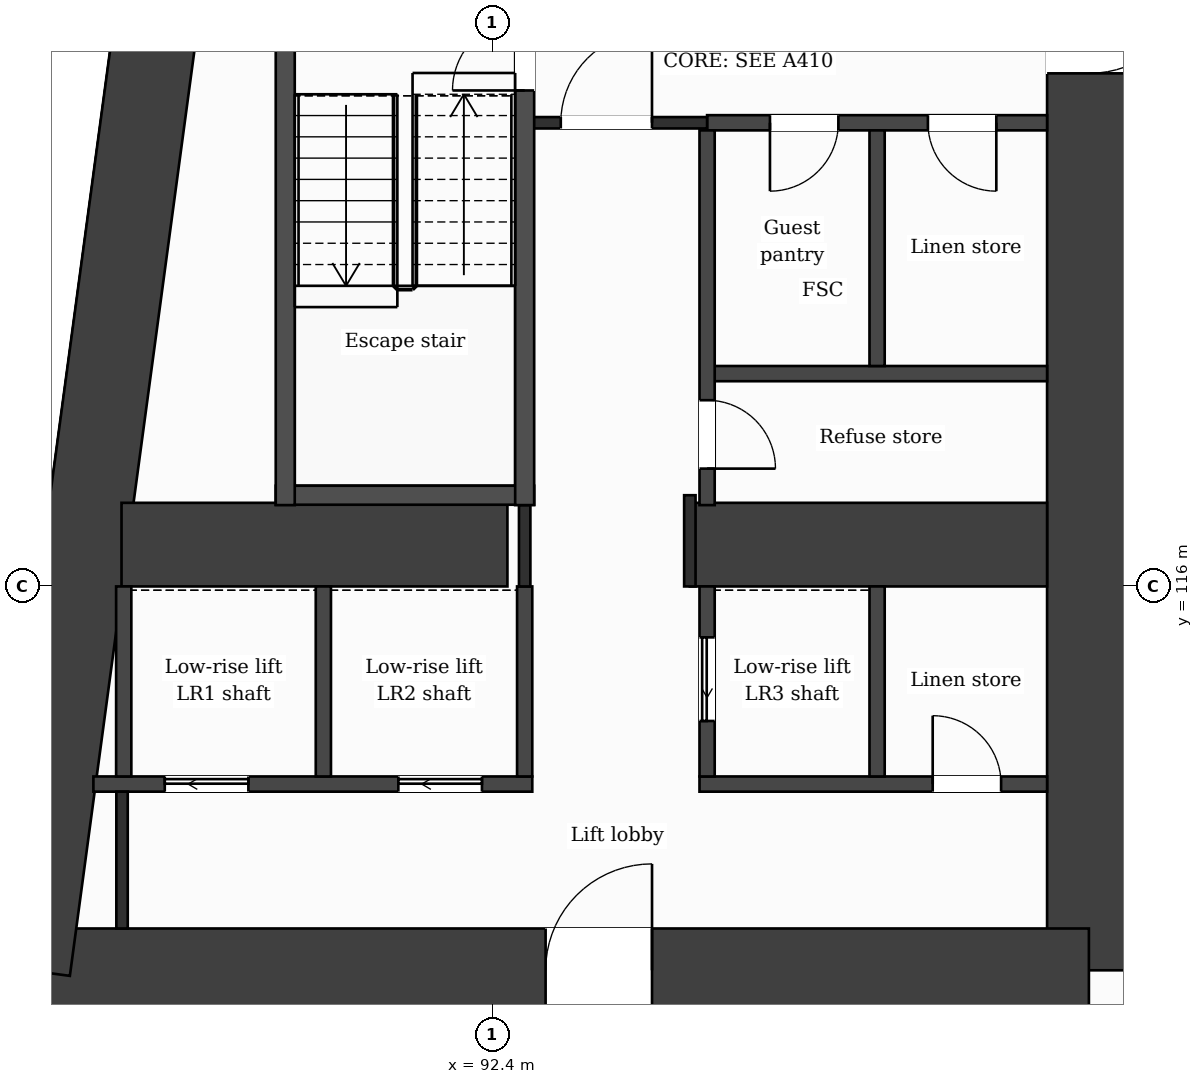
"""IFC4 building model, lengths in metres.
Left out: names, types, materials, properties, quantities, classifications, styles, units other than length and angle.
Written with IfcOpenShell. Run it as: python <this file> out.ifc"""

import sys

from ifc_helpers import new_model, si_unit, direction, frame, frame_2d, origin, place, context, subcontext, project, spatial, rectangle, extrude, element, fill, save


model = new_model("IFC4")
c1 = context("Model", 3, precision=1e-05, world=origin(), true_north=direction((0.0, 1.0)))
c2 = subcontext(c1, "Body", "Model", "MODEL_VIEW")
j1 = project(units=[si_unit("LENGTHUNIT", "METRE"), si_unit("PLANEANGLEUNIT", "RADIAN")], contexts=[c1])
p1 = place(None, origin())
s1 = spatial("IfcSite", under=j1, at=p1, CompositionType="ELEMENT")
p2 = place(p1, origin())
s2 = spatial("IfcBuilding", under=s1, at=p2, CompositionType="ELEMENT")
p3 = place(p2, frame((0.0, 0.0, 49.5)))
s3 = spatial("IfcBuildingStorey", under=s2, at=p3, CompositionType="ELEMENT", Elevation=49.5)
p4 = place(p3, frame((100.25, 131.85, 0.0), z_axis=(0.0, 0.0, 1.0), x_axis=(0.0, -1.0, 0.0)))
e1 = element("IfcWall", 1, at=p4, inside=s3, PredefinedType="SHEAR", context=c2, shape_type="SweptSolid", body=[
    extrude(rectangle(XDim=20.9, YDim=1.1, at=frame_2d((10.45, 0.0))), origin(), (0.0, 0.0, 1.0), 3.5),
])
p5 = place(p4, frame((7.7, 0.0, 0.0)))
e2 = element("IfcOpeningElement", 2, at=p5, cuts=e1, PredefinedType="OPENING", context=c2, shape_type="SweptSolid", body=[
    extrude(rectangle(XDim=1.4, YDim=2.1, at=frame_2d((0.7, 1.05))), frame((0.0, 0.56, 0.0), z_axis=(0.0, -1.0, 0.0), x_axis=(1.0, 0.0, 0.0)), (0.0, 0.0, 1.0), 1.12),
])
p6 = place(p3, frame((100.25, 110.95, 0.0), z_axis=(0.0, 0.0, 1.0), x_axis=(-1.0, 0.0, 0.0)))
e3 = element("IfcWall", 3, at=p6, inside=s3, PredefinedType="SHEAR", context=c2, shape_type="SweptSolid", body=[
    extrude(rectangle(XDim=13.952, YDim=1.1, at=frame_2d((6.976, 0.0))), origin(), (0.0, 0.0, 1.0), 3.5),
])
p7 = place(p6, frame((5.748, 0.0, 0.0)))
e4 = element("IfcOpeningElement", 4, at=p7, cuts=e3, PredefinedType="OPENING", context=c2, shape_type="SweptSolid", body=[
    extrude(rectangle(XDim=1.4, YDim=2.1, at=frame_2d((0.7, 1.05))), frame((0.0, 0.56, 0.0), z_axis=(0.0, -1.0, 0.0), x_axis=(1.0, 0.0, 0.0)), (0.0, 0.0, 1.0), 1.12),
])
p8 = place(p3, frame((86.298, 110.95, 0.0), z_axis=(0.0, 0.0, 1.0), x_axis=(0.133400422634, 0.99106222168, 0.0)))
e5 = element("IfcWall", 5, at=p8, inside=s3, PredefinedType="SHEAR", context=c2, shape_type="SweptSolid", body=[
    extrude(rectangle(XDim=21.089, YDim=1.1, at=frame_2d((10.544, 0.0))), origin(), (0.0, 0.0, 1.0), 3.5),
])
p9 = place(p3, frame((87.523, 116.55, 0.0), z_axis=(0.0, 0.0, 1.0), x_axis=(1.0, 0.0, 0.0)))
e6 = element("IfcWall", 6, at=p9, inside=s3, PredefinedType="SHEAR", context=c2, shape_type="SweptSolid", body=[
    extrude(rectangle(XDim=5.077, YDim=1.1, at=frame_2d((2.539, 0.0))), origin(), (0.0, 0.0, 1.0), 3.5),
])
p10 = place(p3, frame((95.0, 116.55, 0.0), z_axis=(0.0, 0.0, 1.0), x_axis=(1.0, 0.0, 0.0)))
e7 = element("IfcWall", 7, at=p10, inside=s3, PredefinedType="SHEAR", context=c2, shape_type="SweptSolid", body=[
    extrude(rectangle(XDim=4.7, YDim=1.1, at=frame_2d((2.35, 0.0))), origin(), (0.0, 0.0, 1.0), 3.5),
])
p11 = place(p3, frame((87.153, 113.4, 0.0), z_axis=(0.0, 0.0, 1.0), x_axis=(1.0, 0.0, 0.0)))
e8 = element("IfcWall", 8, at=p11, inside=s3, PredefinedType="PARTITIONING", context=c2, shape_type="SweptSolid", body=[
    extrude(rectangle(XDim=5.774, YDim=0.2, at=frame_2d((2.887, 0.0))), origin(), (0.0, 0.0, 1.0), 3.18),
])
p12 = place(p11, frame((0.939, 0.0, 0.0)))
e9 = element("IfcOpeningElement", 9, at=p12, cuts=e8, PredefinedType="OPENING", context=c2, shape_type="SweptSolid", body=[
    extrude(rectangle(XDim=1.1, YDim=2.1, at=frame_2d((0.55, 1.05))), frame((0.0, 0.11, 0.0), z_axis=(0.0, -1.0, 0.0), x_axis=(1.0, 0.0, 0.0)), (0.0, 0.0, 1.0), 0.22),
])
p13 = place(p11, frame((4.012, 0.0, 0.0)))
e10 = element("IfcOpeningElement", 10, at=p13, cuts=e8, PredefinedType="OPENING", context=c2, shape_type="SweptSolid", body=[
    extrude(rectangle(XDim=1.1, YDim=2.1, at=frame_2d((0.55, 1.05))), frame((0.0, 0.11, 0.0), z_axis=(0.0, -1.0, 0.0), x_axis=(1.0, 0.0, 0.0)), (0.0, 0.0, 1.0), 0.22),
])
p14 = place(p3, frame((95.127, 113.4, 0.0), z_axis=(0.0, 0.0, 1.0), x_axis=(1.0, 0.0, 0.0)))
e11 = element("IfcWall", 11, at=p14, inside=s3, PredefinedType="PARTITIONING", context=c2, shape_type="SweptSolid", body=[
    extrude(rectangle(XDim=4.573, YDim=0.2, at=frame_2d((2.287, 0.0))), origin(), (0.0, 0.0, 1.0), 3.18),
])
p15 = place(p14, frame((3.068, 0.0, 0.0)))
e12 = element("IfcOpeningElement", 12, at=p15, cuts=e11, PredefinedType="OPENING", context=c2, shape_type="SweptSolid", body=[
    extrude(rectangle(XDim=0.9, YDim=2.1, at=frame_2d((0.45, 1.05))), frame((0.0, 0.11, 0.0), z_axis=(0.0, -1.0, 0.0), x_axis=(1.0, 0.0, 0.0)), (0.0, 0.0, 1.0), 0.22),
])
p16 = place(p3, frame((89.552, 117.2, 0.0), z_axis=(0.0, 0.0, 1.0), x_axis=(1.0, 0.0, 0.0)))
e13 = element("IfcWall", 13, at=p16, inside=s3, PredefinedType="PARTITIONING", context=c2, shape_type="SweptSolid", body=[
    extrude(rectangle(XDim=3.4, YDim=0.25, at=frame_2d((1.7, 0.0))), origin(), (0.0, 0.0, 1.0), 3.18),
])
p17 = place(p3, frame((95.227, 118.8, 0.0), z_axis=(0.0, 0.0, 1.0), x_axis=(1.0, 0.0, 0.0)))
e14 = element("IfcWall", 14, at=p17, inside=s3, PredefinedType="PARTITIONING", context=c2, shape_type="SweptSolid", body=[
    extrude(rectangle(XDim=4.473, YDim=0.2, at=frame_2d((2.236, 0.0))), origin(), (0.0, 0.0, 1.0), 3.18),
])
p18 = place(p3, frame((95.227, 122.1, 0.0), z_axis=(0.0, 0.0, 1.0), x_axis=(1.0, 0.0, 0.0)))
e15 = element("IfcWall", 15, at=p18, inside=s3, PredefinedType="PARTITIONING", context=c2, shape_type="SweptSolid", body=[
    extrude(rectangle(XDim=4.473, YDim=0.2, at=frame_2d((2.236, 0.0))), origin(), (0.0, 0.0, 1.0), 3.18),
])
p19 = place(p18, frame((0.827, 0.0, 0.0)))
e16 = element("IfcOpeningElement", 16, at=p19, cuts=e15, PredefinedType="OPENING", context=c2, shape_type="SweptSolid", body=[
    extrude(rectangle(XDim=0.9, YDim=2.1, at=frame_2d((0.45, 1.05))), frame((0.0, 0.11, 0.0), z_axis=(0.0, -1.0, 0.0), x_axis=(1.0, 0.0, 0.0)), (0.0, 0.0, 1.0), 0.22),
])
p20 = place(p18, frame((2.905, 0.0, 0.0)))
e17 = element("IfcOpeningElement", 17, at=p20, cuts=e15, PredefinedType="OPENING", context=c2, shape_type="SweptSolid", body=[
    extrude(rectangle(XDim=0.9, YDim=2.1, at=frame_2d((0.45, 1.05))), frame((0.0, 0.11, 0.0), z_axis=(0.0, -1.0, 0.0), x_axis=(1.0, 0.0, 0.0)), (0.0, 0.0, 1.0), 0.22),
])
p21 = place(p3, frame((92.827, 122.1, 0.0), z_axis=(0.0, 0.0, 1.0), x_axis=(1.0, 0.0, 0.0)))
e18 = element("IfcWall", 18, at=p21, inside=s3, PredefinedType="PARTITIONING", context=c2, shape_type="SweptSolid", body=[
    extrude(rectangle(XDim=2.4, YDim=0.15, at=frame_2d((1.2, 0.0))), origin(), (0.0, 0.0, 1.0), 3.18),
])
p22 = place(p21, frame((0.475, 0.0, 0.0)))
e19 = element("IfcOpeningElement", 19, at=p22, cuts=e18, PredefinedType="OPENING", context=c2, shape_type="SweptSolid", body=[
    extrude(rectangle(XDim=1.2, YDim=2.1, at=frame_2d((0.6, 1.05))), frame((0.0, 0.085, 0.0), z_axis=(0.0, -1.0, 0.0), x_axis=(1.0, 0.0, 0.0)), (0.0, 0.0, 1.0), 0.17),
])
p23 = place(p3, frame((87.552, 113.5, 0.0), z_axis=(0.0, 0.0, 1.0), x_axis=(0.0, 1.0, 0.0)))
e20 = element("IfcWall", 20, at=p23, inside=s3, PredefinedType="PARTITIONING", context=c2, shape_type="SweptSolid", body=[
    extrude(rectangle(XDim=2.5, YDim=0.2, at=frame_2d((1.25, 0.0))), origin(), (0.0, 0.0, 1.0), 3.18),
])
p24 = place(p3, frame((87.53, 111.5, 0.0), z_axis=(0.0, 0.0, 1.0), x_axis=(0.0, 1.0, 0.0)))
e21 = element("IfcWall", 21, at=p24, inside=s3, PredefinedType="PARTITIONING", context=c2, shape_type="SweptSolid", body=[
    extrude(rectangle(XDim=1.8, YDim=0.15, at=frame_2d((0.9, 0.0))), origin(), (0.0, 0.0, 1.0), 3.18),
])
p25 = place(p3, frame((89.677, 117.07, 0.0), z_axis=(0.0, 0.0, 1.0), x_axis=(0.0, 1.0, 0.0)))
e22 = element("IfcWall", 22, at=p25, inside=s3, PredefinedType="PARTITIONING", context=c2, shape_type="SweptSolid", body=[
    extrude(rectangle(XDim=6.755, YDim=0.25, at=frame_2d((3.377, 0.0))), origin(), (0.0, 0.0, 1.0), 3.18),
])
for number, where, z_axis, x_axis in (
    (23, (90.178, 113.5, 0.0), (0.0, 0.0, 1.0), (0.0, 1.0, 0.0)),
    (24, (92.827, 113.5, 0.0), (0.0, 0.0, 1.0), (0.0, 1.0, 0.0)),
):
    element("IfcWall", number, at=place(p3, frame(where, z_axis=z_axis, x_axis=x_axis)), inside=s3, PredefinedType="PARTITIONING", context=c2, shape_type="SweptSolid", body=[
        extrude(rectangle(XDim=2.5, YDim=0.2, at=frame_2d((1.25, 0.0))), origin(), (0.0, 0.0, 1.0), 3.18),
    ])
p26 = place(p3, frame((92.827, 116.0, 0.0), z_axis=(0.0, 0.0, 1.0), x_axis=(0.0, 1.0, 0.0)))
e25 = element("IfcWall", 25, at=p26, inside=s3, PredefinedType="PARTITIONING", context=c2, shape_type="SweptSolid", body=[
    extrude(rectangle(XDim=1.07, YDim=0.15, at=frame_2d((0.535, 0.0))), origin(), (0.0, 0.0, 1.0), 3.18),
])
p27 = place(p3, frame((92.827, 117.07, 0.0), z_axis=(0.0, 0.0, 1.0), x_axis=(0.0, 1.0, 0.0)))
e26 = element("IfcWall", 26, at=p27, inside=s3, PredefinedType="PARTITIONING", context=c2, shape_type="SweptSolid", body=[
    extrude(rectangle(XDim=6.755, YDim=0.25, at=frame_2d((3.377, 0.0))), origin(), (0.0, 0.0, 1.0), 3.18),
])
p28 = place(p27, frame((5.455, 0.0, 0.0)))
e27 = element("IfcOpeningElement", 27, at=p28, cuts=e26, PredefinedType="OPENING", context=c2, shape_type="SweptSolid", body=[
    extrude(rectangle(XDim=0.95, YDim=2.1, at=frame_2d((0.475, 1.05))), frame((0.0, 0.135, 0.0), z_axis=(0.0, -1.0, 0.0), x_axis=(1.0, 0.0, 0.0)), (0.0, 0.0, 1.0), 0.27),
])
p29 = place(p3, frame((95.0, 116.0, 0.0), z_axis=(0.0, 0.0, 1.0), x_axis=(0.0, 1.0, 0.0)))
e28 = element("IfcWall", 28, at=p29, inside=s3, PredefinedType="PARTITIONING", context=c2, shape_type="SweptSolid", body=[
    extrude(rectangle(XDim=1.2, YDim=0.15, at=frame_2d((0.6, 0.0))), origin(), (0.0, 0.0, 1.0), 3.18),
])
p30 = place(p3, frame((95.227, 113.5, 0.0), z_axis=(0.0, 0.0, 1.0), x_axis=(0.0, 1.0, 0.0)))
e29 = element("IfcWall", 29, at=p30, inside=s3, PredefinedType="PARTITIONING", context=c2, shape_type="SweptSolid", body=[
    extrude(rectangle(XDim=2.5, YDim=0.2, at=frame_2d((1.25, 0.0))), origin(), (0.0, 0.0, 1.0), 3.18),
])
p31 = place(p30, frame((0.73, 0.0, 0.0)))
e30 = element("IfcOpeningElement", 30, at=p31, cuts=e29, PredefinedType="OPENING", context=c2, shape_type="SweptSolid", body=[
    extrude(rectangle(XDim=1.1, YDim=2.1, at=frame_2d((0.55, 1.05))), frame((0.0, 0.11, 0.0), z_axis=(0.0, -1.0, 0.0), x_axis=(1.0, 0.0, 0.0)), (0.0, 0.0, 1.0), 0.22),
])
p32 = place(p3, frame((95.227, 117.07, 0.0), z_axis=(0.0, 0.0, 1.0), x_axis=(0.0, 1.0, 0.0)))
e31 = element("IfcWall", 31, at=p32, inside=s3, PredefinedType="PARTITIONING", context=c2, shape_type="SweptSolid", body=[
    extrude(rectangle(XDim=4.93, YDim=0.2, at=frame_2d((2.465, 0.0))), origin(), (0.0, 0.0, 1.0), 3.18),
])
p33 = place(p32, frame((0.48, 0.0, 0.0)))
e32 = element("IfcOpeningElement", 32, at=p33, cuts=e31, PredefinedType="OPENING", context=c2, shape_type="SweptSolid", body=[
    extrude(rectangle(XDim=0.9, YDim=2.1, at=frame_2d((0.45, 1.05))), frame((0.0, 0.11, 0.0), z_axis=(0.0, -1.0, 0.0), x_axis=(1.0, 0.0, 0.0)), (0.0, 0.0, 1.0), 0.22),
])
p34 = place(p3, frame((97.463, 113.5, 0.0), z_axis=(0.0, 0.0, 1.0), x_axis=(0.0, 1.0, 0.0)))
e33 = element("IfcWall", 33, at=p34, inside=s3, PredefinedType="PARTITIONING", context=c2, shape_type="SweptSolid", body=[
    extrude(rectangle(XDim=2.5, YDim=0.2, at=frame_2d((1.25, 0.0))), origin(), (0.0, 0.0, 1.0), 3.18),
])
p35 = place(p3, frame((97.463, 118.9, 0.0), z_axis=(0.0, 0.0, 1.0), x_axis=(0.0, 1.0, 0.0)))
e34 = element("IfcWall", 34, at=p35, inside=s3, PredefinedType="PARTITIONING", context=c2, shape_type="SweptSolid", body=[
    extrude(rectangle(XDim=3.1, YDim=0.2, at=frame_2d((1.55, 0.0))), origin(), (0.0, 0.0, 1.0), 3.18),
])
p36 = place(p22, origin())
e35 = element("IfcDoor", 35, at=p36, inside=s3, OperationType="SINGLE_SWING_RIGHT", PredefinedType="DOOR", context=c2, shape_type="SweptSolid", body=[
    extrude(rectangle(XDim=1.2, YDim=2.1, at=frame_2d((0.6, 1.05))), frame((0.0, 0.025, 0.0), z_axis=(0.0, -1.0, 0.0), x_axis=(1.0, 0.0, 0.0)), (0.0, 0.0, 1.0), 0.05),
])
fill(e19, e35)
p37 = place(p19, origin())
e36 = element("IfcDoor", 36, at=p37, inside=s3, OperationType="SINGLE_SWING_LEFT", PredefinedType="DOOR", context=c2, shape_type="SweptSolid", body=[
    extrude(rectangle(XDim=0.9, YDim=2.1, at=frame_2d((0.45, 1.05))), frame((0.0, 0.025, 0.0), z_axis=(0.0, -1.0, 0.0), x_axis=(1.0, 0.0, 0.0)), (0.0, 0.0, 1.0), 0.05),
])
fill(e16, e36)
p38 = place(p20, origin())
e37 = element("IfcDoor", 37, at=p38, inside=s3, OperationType="SINGLE_SWING_RIGHT", PredefinedType="DOOR", context=c2, shape_type="SweptSolid", body=[
    extrude(rectangle(XDim=0.9, YDim=2.1, at=frame_2d((0.45, 1.05))), frame((0.0, 0.025, 0.0), z_axis=(0.0, -1.0, 0.0), x_axis=(1.0, 0.0, 0.0)), (0.0, 0.0, 1.0), 0.05),
])
fill(e17, e37)
p39 = place(p28, origin())
e38 = element("IfcDoor", 38, at=p39, inside=s3, OperationType="SINGLE_SWING_LEFT", PredefinedType="DOOR", context=c2, shape_type="SweptSolid", body=[
    extrude(rectangle(XDim=0.95, YDim=2.1, at=frame_2d((0.475, 1.05))), frame((0.0, 0.025, 0.0), z_axis=(0.0, -1.0, 0.0), x_axis=(1.0, 0.0, 0.0)), (0.0, 0.0, 1.0), 0.05),
])
fill(e27, e38)
p40 = place(p33, origin())
e39 = element("IfcDoor", 39, at=p40, inside=s3, OperationType="SINGLE_SWING_LEFT", PredefinedType="DOOR", context=c2, shape_type="SweptSolid", body=[
    extrude(rectangle(XDim=0.9, YDim=2.1, at=frame_2d((0.45, 1.05))), frame((0.0, 0.025, 0.0), z_axis=(0.0, -1.0, 0.0), x_axis=(1.0, 0.0, 0.0)), (0.0, 0.0, 1.0), 0.05),
])
fill(e32, e39)
p41 = place(p12, origin())
e40 = element("IfcDoor", 40, at=p41, inside=s3, OperationType="SLIDING_TO_LEFT", PredefinedType="DOOR", context=c2, shape_type="SweptSolid", body=[
    extrude(rectangle(XDim=1.1, YDim=2.1, at=frame_2d((0.55, 1.05))), frame((0.0, 0.025, 0.0), z_axis=(0.0, -1.0, 0.0), x_axis=(1.0, 0.0, 0.0)), (0.0, 0.0, 1.0), 0.05),
])
fill(e9, e40)
p42 = place(p13, origin())
e41 = element("IfcDoor", 41, at=p42, inside=s3, OperationType="SLIDING_TO_LEFT", PredefinedType="DOOR", context=c2, shape_type="SweptSolid", body=[
    extrude(rectangle(XDim=1.1, YDim=2.1, at=frame_2d((0.55, 1.05))), frame((0.0, 0.025, 0.0), z_axis=(0.0, -1.0, 0.0), x_axis=(1.0, 0.0, 0.0)), (0.0, 0.0, 1.0), 0.05),
])
fill(e10, e41)
p43 = place(p31, origin())
e42 = element("IfcDoor", 42, at=p43, inside=s3, OperationType="SLIDING_TO_LEFT", PredefinedType="DOOR", context=c2, shape_type="SweptSolid", body=[
    extrude(rectangle(XDim=1.1, YDim=2.1, at=frame_2d((0.55, 1.05))), frame((0.0, 0.025, 0.0), z_axis=(0.0, -1.0, 0.0), x_axis=(1.0, 0.0, 0.0)), (0.0, 0.0, 1.0), 0.05),
])
fill(e30, e42)
p44 = place(p15, origin())
e43 = element("IfcDoor", 43, at=p44, inside=s3, OperationType="SINGLE_SWING_LEFT", PredefinedType="DOOR", context=c2, shape_type="SweptSolid", body=[
    extrude(rectangle(XDim=0.9, YDim=2.1, at=frame_2d((0.45, 1.05))), frame((0.0, 0.025, 0.0), z_axis=(0.0, -1.0, 0.0), x_axis=(1.0, 0.0, 0.0)), (0.0, 0.0, 1.0), 0.05),
])
fill(e12, e43)
p45 = place(p7, origin())
e44 = element("IfcDoor", 44, at=p45, inside=s3, OperationType="SINGLE_SWING_LEFT", PredefinedType="DOOR", context=c2, shape_type="SweptSolid", body=[
    extrude(rectangle(XDim=1.4, YDim=2.1, at=frame_2d((0.7, 1.05))), frame((0.0, 0.025, 0.0), z_axis=(0.0, -1.0, 0.0), x_axis=(1.0, 0.0, 0.0)), (0.0, 0.0, 1.0), 0.05),
])
fill(e4, e44)
p46 = place(p5, origin())
e45 = element("IfcDoor", 45, at=p46, inside=s3, OperationType="SINGLE_SWING_LEFT", PredefinedType="DOOR", context=c2, shape_type="SweptSolid", body=[
    extrude(rectangle(XDim=1.4, YDim=2.1, at=frame_2d((0.7, 1.05))), frame((0.0, 0.025, 0.0), z_axis=(0.0, -1.0, 0.0), x_axis=(1.0, 0.0, 0.0)), (0.0, 0.0, 1.0), 0.05),
])
fill(e2, e45)
save(model, sys.argv[1])
